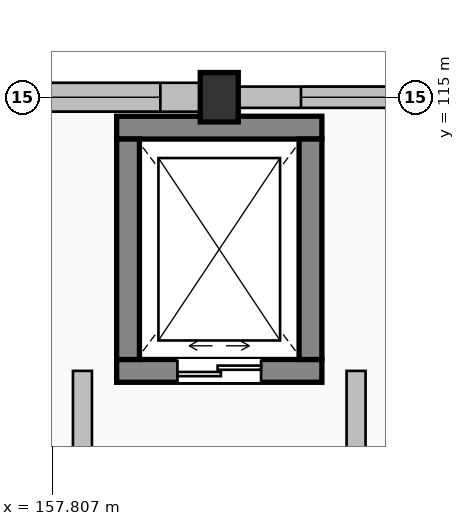
"""IFC4 building model, lengths in metres.
Left out: names, types, materials, properties, quantities, classifications, styles, units other than length and angle.
Written with IfcOpenShell. Run it as: python <this file> out.ifc"""

import sys

from ifc_helpers import new_model, si_unit, direction, frame, frame_2d, origin, origin_2d, place, context, subcontext, project, spatial, rectangle, extrude, element, fill, save


model = new_model("IFC4")
c1 = context("Model", 3, precision=1e-05, world=origin(), true_north=direction((0.0, 1.0)))
c2 = subcontext(c1, "Body", "Model", "MODEL_VIEW")
j1 = project(units=[si_unit("LENGTHUNIT", "METRE"), si_unit("PLANEANGLEUNIT", "RADIAN")], contexts=[c1])
p1 = place(None, origin())
s1 = spatial("IfcSite", under=j1, at=p1, CompositionType="ELEMENT")
p2 = place(p1, origin())
s2 = spatial("IfcBuilding", under=s1, at=p2, CompositionType="ELEMENT")
p3 = place(p2, frame((0.0, 0.0, 18.3)))
s3 = spatial("IfcBuildingStorey", under=s2, at=p3, CompositionType="ELEMENT", Elevation=18.3)
p4 = place(p3, frame((160.0, 115.0, 0.0), z_axis=(0.0, 0.0, 1.0), x_axis=(1.0, 0.0, 0.0)))
e1 = element("IfcColumn", 1, at=p4, inside=s3, PredefinedType="PILASTER", context=c2, shape_type="SweptSolid", body=[
    extrude(rectangle(XDim=0.5, YDim=0.65, at=origin_2d()), origin(), (0.0, 0.0, 1.0), 4.5),
])
p5 = place(p3, frame((156.3, 115.0, 0.0), z_axis=(0.0, 0.0, 1.0), x_axis=(1.0, 0.0, 0.0)))
e2 = element("IfcWall", 2, at=p5, inside=s3, PredefinedType="SOLIDWALL", context=c2, shape_type="SweptSolid", body=[
    extrude(rectangle(XDim=3.45, YDim=0.38, at=frame_2d((1.725, 0.0))), origin(), (0.0, 0.0, 1.0), 3.685),
])
p6 = place(p5, frame((0.525, 0.0, 0.95)))
e3 = element("IfcOpeningElement", 3, at=p6, cuts=e2, PredefinedType="OPENING", context=c2, shape_type="SweptSolid", body=[
    extrude(rectangle(XDim=2.4, YDim=1.8, at=frame_2d((1.2, 0.9))), frame((0.0, 0.2, 0.0), z_axis=(0.0, -1.0, 0.0), x_axis=(1.0, 0.0, 0.0)), (0.0, 0.0, 1.0), 0.4),
])
p7 = place(p3, frame((160.25, 115.0, 0.0), z_axis=(0.0, 0.0, 1.0), x_axis=(1.0, 0.0, 0.0)))
e4 = element("IfcWall", 4, at=p7, inside=s3, PredefinedType="SOLIDWALL", context=c2, shape_type="SweptSolid", body=[
    extrude(rectangle(XDim=3.45, YDim=0.28, at=frame_2d((1.725, 0.0))), origin(), (0.0, 0.0, 1.0), 3.685),
])
p8 = place(p7, frame((0.825, 0.0, 0.95)))
e5 = element("IfcOpeningElement", 5, at=p8, cuts=e4, PredefinedType="OPENING", context=c2, shape_type="SweptSolid", body=[
    extrude(rectangle(XDim=1.8, YDim=1.5, at=frame_2d((0.9, 0.75))), frame((0.0, 0.15, 0.0), z_axis=(0.0, -1.0, 0.0), x_axis=(1.0, 0.0, 0.0)), (0.0, 0.0, 1.0), 0.3),
])
p9 = place(p3, frame((158.65, 111.4, 0.0), z_axis=(0.0, 0.0, 1.0), x_axis=(1.0, 0.0, 0.0)))
e6 = element("IfcWall", 6, at=p9, inside=s3, PredefinedType="SHEAR", context=c2, shape_type="SweptSolid", body=[
    extrude(rectangle(XDim=2.7, YDim=0.3, at=frame_2d((1.35, 0.0))), origin(), (0.0, 0.0, 1.0), 4.2),
])
p10 = place(p9, frame((0.8, 0.0, 0.0)))
e7 = element("IfcOpeningElement", 7, at=p10, cuts=e6, PredefinedType="OPENING", context=c2, shape_type="SweptSolid", body=[
    extrude(rectangle(XDim=1.1, YDim=2.15, at=frame_2d((0.55, 1.075))), frame((0.0, 0.16, 0.0), z_axis=(0.0, -1.0, 0.0), x_axis=(1.0, 0.0, 0.0)), (0.0, 0.0, 1.0), 0.32),
])
p11 = place(p3, frame((161.35, 114.6, 0.0), z_axis=(0.0, 0.0, 1.0), x_axis=(-1.0, 0.0, 0.0)))
e8 = element("IfcWall", 8, at=p11, inside=s3, PredefinedType="SHEAR", context=c2, shape_type="SweptSolid", body=[
    extrude(rectangle(XDim=2.7, YDim=0.3, at=frame_2d((1.35, 0.0))), origin(), (0.0, 0.0, 1.0), 4.2),
])
for number, where, z_axis, x_axis in (
    (9, (158.8, 111.55, 0.0), (0.0, 0.0, 1.0), (0.0, 1.0, 0.0)),
    (10, (161.2, 114.45, 0.0), (0.0, 0.0, 1.0), (0.0, -1.0, 0.0)),
):
    element("IfcWall", number, at=place(p3, frame(where, z_axis=z_axis, x_axis=x_axis)), inside=s3, PredefinedType="SHEAR", context=c2, shape_type="SweptSolid", body=[
        extrude(rectangle(XDim=2.9, YDim=0.3, at=frame_2d((1.45, 0.0))), origin(), (0.0, 0.0, 1.0), 4.2),
    ])
for number, where, z_axis, x_axis in (
    (11, (158.2, 107.8, 0.0), (0.0, 0.0, 1.0), (0.0, 1.0, 0.0)),
    (12, (161.8, 111.4, 0.0), (0.0, 0.0, 1.0), (0.0, -1.0, 0.0)),
):
    element("IfcWall", number, at=place(p3, frame(where, z_axis=z_axis, x_axis=x_axis)), inside=s3, PredefinedType="SOLIDWALL", context=c2, shape_type="SweptSolid", body=[
        extrude(rectangle(XDim=3.6, YDim=0.25, at=frame_2d((1.8, 0.0))), origin(), (0.0, 0.0, 1.0), 4.2),
    ])
p12 = place(p6, origin())
e13 = element("IfcWindow", 13, at=p12, inside=s3, PartitioningType="TRIPLE_PANEL_VERTICAL", PredefinedType="WINDOW", context=c2, shape_type="SweptSolid", body=[
    extrude(rectangle(XDim=2.4, YDim=1.8, at=frame_2d((1.2, 0.9))), frame((0.0, 0.03, 0.0), z_axis=(0.0, -1.0, 0.0), x_axis=(1.0, 0.0, 0.0)), (0.0, 0.0, 1.0), 0.06),
])
fill(e3, e13)
p13 = place(p8, origin())
e14 = element("IfcWindow", 14, at=p13, inside=s3, PartitioningType="DOUBLE_PANEL_VERTICAL", PredefinedType="WINDOW", context=c2, shape_type="SweptSolid", body=[
    extrude(rectangle(XDim=1.8, YDim=1.5, at=frame_2d((0.9, 0.75))), frame((0.0, 0.03, 0.0), z_axis=(0.0, -1.0, 0.0), x_axis=(1.0, 0.0, 0.0)), (0.0, 0.0, 1.0), 0.06),
])
fill(e5, e14)
p14 = place(p10, origin())
e15 = element("IfcDoor", 15, at=p14, inside=s3, OperationType="DOUBLE_DOOR_SLIDING", PredefinedType="DOOR", context=c2, shape_type="SweptSolid", body=[
    extrude(rectangle(XDim=1.1, YDim=2.15, at=frame_2d((0.55, 1.075))), frame((0.0, 0.025, 0.0), z_axis=(0.0, -1.0, 0.0), x_axis=(1.0, 0.0, 0.0)), (0.0, 0.0, 1.0), 0.05),
])
fill(e7, e15)
save(model, sys.argv[1])
